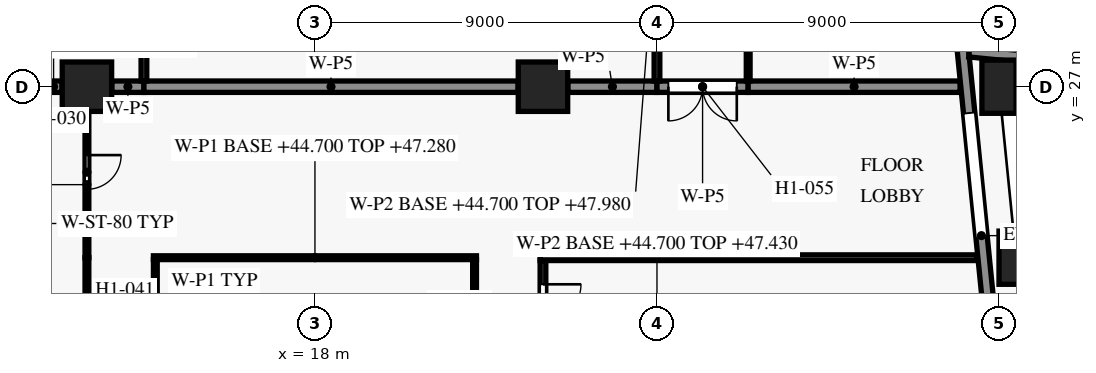
"""IFC4 building model, lengths in metres.
Left out: names, types, materials, properties, quantities, classifications, styles, units other than length and angle.
Written with IfcOpenShell. Run it as: python <this file> out.ifc"""

import sys

from ifc_helpers import new_model, si_unit, direction, frame, frame_2d, origin, origin_2d, place, context, subcontext, project, spatial, rectangle, extrude, element, fill, save


model = new_model("IFC4")
c1 = context("Model", 3, precision=1e-05, world=origin(), true_north=direction((0.0, 1.0)))
c2 = subcontext(c1, "Body", "Model", "MODEL_VIEW")
j1 = project(units=[si_unit("LENGTHUNIT", "METRE"), si_unit("PLANEANGLEUNIT", "RADIAN")], contexts=[c1])
p1 = place(None, origin())
s1 = spatial("IfcSite", under=j1, at=p1, CompositionType="ELEMENT")
p2 = place(p1, origin())
s2 = spatial("IfcBuilding", under=s1, at=p2, CompositionType="ELEMENT")
p3 = place(p2, frame((0.0, 0.0, 44.7)))
s3 = spatial("IfcBuildingStorey", under=s2, at=p3, CompositionType="ELEMENT", Elevation=44.7)
for number, where, z_axis, x_axis in (
    (1, (36.45, 22.5, 0.0), (0.0, 0.0, 1.0), (-0.1, 0.995, 0.0)),
    (2, (36.0, 27.0, 0.0), (0.0, 0.0, 1.0), (-0.1, 0.995, 0.0)),
):
    element("IfcColumn", number, at=place(p3, frame(where, z_axis=z_axis, x_axis=x_axis)), inside=s3, PredefinedType="COLUMN", context=c2, shape_type="SweptSolid", body=[
        extrude(rectangle(XDim=0.9, YDim=1.4, at=origin_2d()), origin(), (0.0, 0.0, 1.0), 3.6),
    ])
for number, where, z_axis, x_axis in (
    (3, (12.0, 27.0, 0.0), (0.0, 0.0, 1.0), (1.0, 0.0, 0.0)),
    (4, (24.0, 27.0, 0.0), (0.0, 0.0, 1.0), (1.0, 0.0, 0.0)),
):
    element("IfcColumn", number, at=place(p3, frame(where, z_axis=z_axis, x_axis=x_axis)), inside=s3, PredefinedType="COLUMN", context=c2, shape_type="SweptSolid", body=[
        extrude(rectangle(XDim=1.3, YDim=1.3, at=origin_2d()), origin(), (0.0, 0.0, 1.0), 3.6),
    ])
p4 = place(p3, frame((35.033, 28.132, 0.0), z_axis=(0.0, 0.0, 1.0), x_axis=(0.099487051997, -0.995038856771, 0.0)))
e5 = element("IfcWall", 5, at=p4, inside=s3, PredefinedType="SOLIDWALL", context=c2, shape_type="SweptSolid", body=[
    extrude(rectangle(XDim=10.152, YDim=0.3, at=frame_2d((5.076, 0.0))), origin(), (0.0, 0.0, 1.0), 2.95),
])
p5 = place(p4, frame((1.833, 0.0, 0.15)))
e6 = element("IfcOpeningElement", 6, at=p5, cuts=e5, PredefinedType="OPENING", context=c2, shape_type="SweptSolid", body=[
    extrude(rectangle(XDim=3.3, YDim=2.4, at=frame_2d((1.65, 1.2))), frame((0.0, 0.16, 0.0), z_axis=(0.0, -1.0, 0.0), x_axis=(1.0, 0.0, 0.0)), (0.0, 0.0, 1.0), 0.32),
])
p6 = place(p4, frame((7.106, 0.0, 0.75)))
e7 = element("IfcOpeningElement", 7, at=p6, cuts=e5, PredefinedType="OPENING", context=c2, shape_type="SweptSolid", body=[
    extrude(rectangle(XDim=1.8, YDim=1.8, at=frame_2d((0.9, 0.9))), frame((0.0, 0.16, 0.0), z_axis=(0.0, -1.0, 0.0), x_axis=(1.0, 0.0, 0.0)), (0.0, 0.0, 1.0), 0.32),
])
p7 = place(p3, frame((45.015, 26.953, 0.0), z_axis=(0.0, 0.0, 1.0), x_axis=(-0.995036699177, 0.099508629231, 0.0)))
e8 = element("IfcWall", 8, at=p7, inside=s3, PredefinedType="SOLIDWALL", context=c2, shape_type="SweptSolid", body=[
    extrude(rectangle(XDim=9.846, YDim=0.3, at=frame_2d((4.923, 0.0))), origin(), (0.0, 0.0, 1.0), 2.95),
])
p8 = place(p7, frame((1.291, 0.0, 0.75)))
e9 = element("IfcOpeningElement", 9, at=p8, cuts=e8, PredefinedType="OPENING", context=c2, shape_type="SweptSolid", body=[
    extrude(rectangle(XDim=1.8, YDim=1.8, at=frame_2d((0.9, 0.9))), frame((0.0, 0.16, 0.0), z_axis=(0.0, -1.0, 0.0), x_axis=(1.0, 0.0, 0.0)), (0.0, 0.0, 1.0), 0.32),
])
p9 = place(p7, frame((5.064, 0.0, 0.15)))
e10 = element("IfcOpeningElement", 10, at=p9, cuts=e8, PredefinedType="OPENING", context=c2, shape_type="SweptSolid", body=[
    extrude(rectangle(XDim=3.3, YDim=2.4, at=frame_2d((1.65, 1.2))), frame((0.0, 0.16, 0.0), z_axis=(0.0, -1.0, 0.0), x_axis=(1.0, 0.0, 0.0)), (0.0, 0.0, 1.0), 0.32),
])
p10 = place(p3, frame((22.2, 18.05, 0.0), z_axis=(0.0, 0.0, 1.0), x_axis=(0.0, 1.0, 0.0)))
e11 = element("IfcWall", 11, at=p10, inside=s3, PredefinedType="PARTITIONING", context=c2, shape_type="SweptSolid", body=[
    extrude(rectangle(XDim=4.4, YDim=0.1, at=frame_2d((2.2, 0.0))), origin(), (0.0, 0.0, 1.0), 2.73),
])
p11 = place(p3, frame((24.0, 22.425, 0.0), z_axis=(0.0, 0.0, 1.0), x_axis=(0.0, -1.0, 0.0)))
e12 = element("IfcWall", 12, at=p11, inside=s3, PredefinedType="PARTITIONING", context=c2, shape_type="SweptSolid", body=[
    extrude(rectangle(XDim=2.25, YDim=0.15, at=frame_2d((1.125, 0.0))), origin(), (0.0, 0.0, 1.0), 2.58),
])
p12 = place(p11, frame((0.625, 0.0, 0.0)))
e13 = element("IfcOpeningElement", 13, at=p12, cuts=e12, PredefinedType="OPENING", context=c2, shape_type="SweptSolid", body=[
    extrude(rectangle(XDim=1.0, YDim=2.1, at=frame_2d((0.5, 1.05))), frame((0.0, 0.085, 0.0), z_axis=(0.0, -1.0, 0.0), x_axis=(1.0, 0.0, 0.0)), (0.0, 0.0, 1.0), 0.17),
])
p13 = place(p3, frame((13.8, 22.45, 0.0), z_axis=(0.0, 0.0, 1.0), x_axis=(0.0, -1.0, 0.0)))
e14 = element("IfcWall", 14, at=p13, inside=s3, PredefinedType="PARTITIONING", context=c2, shape_type="SweptSolid", body=[
    extrude(rectangle(XDim=4.25, YDim=0.1, at=frame_2d((2.125, 0.0))), origin(), (0.0, 0.0, 1.0), 3.28),
])
p14 = place(p13, frame((1.75, 0.0, 0.0)))
e15 = element("IfcOpeningElement", 15, at=p14, cuts=e14, PredefinedType="OPENING", context=c2, shape_type="SweptSolid", body=[
    extrude(rectangle(XDim=0.9, YDim=2.1, at=frame_2d((0.45, 1.05))), frame((0.0, 0.06, 0.0), z_axis=(0.0, -1.0, 0.0), x_axis=(1.0, 0.0, 0.0)), (0.0, 0.0, 1.0), 0.12),
])
p15 = place(p3, frame((12.0, 22.5, 0.0), z_axis=(0.0, 0.0, 1.0), x_axis=(0.0, -1.0, 0.0)))
e16 = element("IfcWall", 16, at=p15, inside=s3, PredefinedType="PARTITIONING", context=c2, shape_type="SweptSolid", body=[
    extrude(rectangle(XDim=3.845, YDim=0.1, at=frame_2d((1.922, 0.0))), origin(), (0.0, 0.0, 1.0), 2.58),
])
p16 = place(p3, frame((12.0, 26.345, 0.0), z_axis=(0.0, 0.0, 1.0), x_axis=(0.0, -1.0, 0.0)))
e17 = element("IfcWall", 17, at=p16, inside=s3, PredefinedType="PARTITIONING", context=c2, shape_type="SweptSolid", body=[
    extrude(rectangle(XDim=3.845, YDim=0.1, at=frame_2d((1.922, 0.0))), origin(), (0.0, 0.0, 1.0), 2.58),
])
p17 = place(p16, frame((1.145, 0.0, 0.0)))
e18 = element("IfcOpeningElement", 18, at=p17, cuts=e17, PredefinedType="OPENING", context=c2, shape_type="SweptSolid", body=[
    extrude(rectangle(XDim=0.9, YDim=2.1, at=frame_2d((0.45, 1.05))), frame((0.0, 0.06, 0.0), z_axis=(0.0, -1.0, 0.0), x_axis=(1.0, 0.0, 0.0)), (0.0, 0.0, 1.0), 0.12),
])
p18 = place(p3, frame((22.25, 22.5, 0.0), z_axis=(0.0, 0.0, 1.0), x_axis=(-1.0, 0.0, 0.0)))
e19 = element("IfcWall", 19, at=p18, inside=s3, PredefinedType="PARTITIONING", context=c2, shape_type="SweptSolid", body=[
    extrude(rectangle(XDim=8.5, YDim=0.1, at=frame_2d((4.25, 0.0))), origin(), (0.0, 0.0, 1.0), 2.58),
])
p19 = place(p3, frame((35.425, 22.5, 0.0), z_axis=(0.0, 0.0, 1.0), x_axis=(-1.0, 0.0, 0.0)))
e20 = element("IfcWall", 20, at=p19, inside=s3, PredefinedType="PARTITIONING", context=c2, shape_type="SweptSolid", body=[
    extrude(rectangle(XDim=11.5, YDim=0.15, at=frame_2d((5.75, 0.0))), origin(), (0.0, 0.0, 1.0), 2.58),
])
p20 = place(p3, frame((11.345, 27.0, 0.0), z_axis=(0.0, 0.0, 1.0), x_axis=(-1.0, 0.0, 0.0)))
e21 = element("IfcWall", 21, at=p20, inside=s3, PredefinedType="PARTITIONING", context=c2, shape_type="SweptSolid", body=[
    extrude(rectangle(XDim=0.445, YDim=0.3, at=frame_2d((0.223, 0.0))), origin(), (0.0, 0.0, 1.0), 3.28),
])
p21 = place(p3, frame((13.5, 27.0, 0.0), z_axis=(0.0, 0.0, 1.0), x_axis=(-1.0, 0.0, 0.0)))
e22 = element("IfcWall", 22, at=p21, inside=s3, PredefinedType="PARTITIONING", context=c2, shape_type="SweptSolid", body=[
    extrude(rectangle(XDim=0.845, YDim=0.3, at=frame_2d((0.422, 0.0))), origin(), (0.0, 0.0, 1.0), 2.58),
])
p22 = place(p3, frame((23.345, 27.0, 0.0), z_axis=(0.0, 0.0, 1.0), x_axis=(-1.0, 0.0, 0.0)))
e23 = element("IfcWall", 23, at=p22, inside=s3, PredefinedType="PARTITIONING", context=c2, shape_type="SweptSolid", body=[
    extrude(rectangle(XDim=9.845, YDim=0.3, at=frame_2d((4.922, 0.0))), origin(), (0.0, 0.0, 1.0), 2.58),
])
p23 = place(p3, frame((27.0, 27.0, 0.0), z_axis=(0.0, 0.0, 1.0), x_axis=(-1.0, 0.0, 0.0)))
e24 = element("IfcWall", 24, at=p23, inside=s3, PredefinedType="PARTITIONING", context=c2, shape_type="SweptSolid", body=[
    extrude(rectangle(XDim=2.345, YDim=0.3, at=frame_2d((1.172, 0.0))), origin(), (0.0, 0.0, 1.0), 2.58),
])
p24 = place(p3, frame((29.4, 27.0, 0.0), z_axis=(0.0, 0.0, 1.0), x_axis=(-1.0, 0.0, 0.0)))
e25 = element("IfcWall", 25, at=p24, inside=s3, PredefinedType="PARTITIONING", context=c2, shape_type="SweptSolid", body=[
    extrude(rectangle(XDim=2.4, YDim=0.3, at=frame_2d((1.2, 0.0))), origin(), (0.0, 0.0, 1.0), 2.58),
])
p25 = place(p24, frame((0.3, 0.0, 0.0)))
e26 = element("IfcOpeningElement", 26, at=p25, cuts=e25, PredefinedType="OPENING", context=c2, shape_type="SweptSolid", body=[
    extrude(rectangle(XDim=1.8, YDim=2.1, at=frame_2d((0.9, 1.05))), frame((0.0, 0.16, 0.0), z_axis=(0.0, -1.0, 0.0), x_axis=(1.0, 0.0, 0.0)), (0.0, 0.0, 1.0), 0.32),
])
p26 = place(p3, frame((34.975, 27.0, 0.0), z_axis=(0.0, 0.0, 1.0), x_axis=(-1.0, 0.0, 0.0)))
e27 = element("IfcWall", 27, at=p26, inside=s3, PredefinedType="PARTITIONING", context=c2, shape_type="SweptSolid", body=[
    extrude(rectangle(XDim=5.575, YDim=0.3, at=frame_2d((2.788, 0.0))), origin(), (0.0, 0.0, 1.0), 2.58),
])
p27 = place(p3, frame((27.0, 27.15, 0.0), z_axis=(0.0, 0.0, 1.0), x_axis=(0.0, 1.0, 0.0)))
e28 = element("IfcWall", 28, at=p27, inside=s3, PredefinedType="PARTITIONING", context=c2, shape_type="SweptSolid", body=[
    extrude(rectangle(XDim=8.7, YDim=0.15, at=frame_2d((4.35, 0.0))), origin(), (0.0, 0.0, 1.0), 3.28),
])
p28 = place(p27, frame((3.45, 0.0, 0.0)))
e29 = element("IfcOpeningElement", 29, at=p28, cuts=e28, PredefinedType="OPENING", context=c2, shape_type="SweptSolid", body=[
    extrude(rectangle(XDim=1.8, YDim=2.1, at=frame_2d((0.9, 1.05))), frame((0.0, 0.085, 0.0), z_axis=(0.0, -1.0, 0.0), x_axis=(1.0, 0.0, 0.0)), (0.0, 0.0, 1.0), 0.17),
])
p29 = place(p3, frame((13.5, 27.15, 0.0), z_axis=(0.0, 0.0, 1.0), x_axis=(0.0, 1.0, 0.0)))
e30 = element("IfcWall", 30, at=p29, inside=s3, PredefinedType="PARTITIONING", context=c2, shape_type="SweptSolid", body=[
    extrude(rectangle(XDim=8.7, YDim=0.15, at=frame_2d((4.35, 0.0))), origin(), (0.0, 0.0, 1.0), 3.28),
])
p30 = place(p29, frame((3.45, 0.0, 0.0)))
e31 = element("IfcOpeningElement", 31, at=p30, cuts=e30, PredefinedType="OPENING", context=c2, shape_type="SweptSolid", body=[
    extrude(rectangle(XDim=1.8, YDim=2.1, at=frame_2d((0.9, 1.05))), frame((0.0, 0.085, 0.0), z_axis=(0.0, -1.0, 0.0), x_axis=(1.0, 0.0, 0.0)), (0.0, 0.0, 1.0), 0.17),
])
p31 = place(p3, frame((29.4, 35.95, 0.0), z_axis=(0.0, 0.0, 1.0), x_axis=(0.0, -1.0, 0.0)))
e32 = element("IfcWall", 32, at=p31, inside=s3, PredefinedType="PARTITIONING", context=c2, shape_type="SweptSolid", body=[
    extrude(rectangle(XDim=8.8, YDim=0.1, at=frame_2d((4.4, 0.0))), origin(), (0.0, 0.0, 1.0), 3.28),
])
p32 = place(p31, frame((4.5, 0.0, 0.0)))
e33 = element("IfcOpeningElement", 33, at=p32, cuts=e32, PredefinedType="OPENING", context=c2, shape_type="SweptSolid", body=[
    extrude(rectangle(XDim=0.9, YDim=2.1, at=frame_2d((0.45, 1.05))), frame((0.0, 0.06, 0.0), z_axis=(0.0, -1.0, 0.0), x_axis=(1.0, 0.0, 0.0)), (0.0, 0.0, 1.0), 0.12),
])
p33 = place(p5, origin())
e34 = element("IfcWindow", 34, at=p33, inside=s3, PartitioningType="SINGLE_PANEL", PredefinedType="WINDOW", context=c2, shape_type="SweptSolid", body=[
    extrude(rectangle(XDim=3.3, YDim=2.4, at=frame_2d((1.65, 1.2))), frame((0.0, 0.03, 0.0), z_axis=(0.0, -1.0, 0.0), x_axis=(1.0, 0.0, 0.0)), (0.0, 0.0, 1.0), 0.06),
])
fill(e6, e34)
p34 = place(p17, origin())
e35 = element("IfcDoor", 35, at=p34, inside=s3, OperationType="SINGLE_SWING_LEFT", PredefinedType="DOOR", context=c2, shape_type="SweptSolid", body=[
    extrude(rectangle(XDim=0.9, YDim=2.1, at=frame_2d((0.45, 1.05))), frame((0.0, 0.025, 0.0), z_axis=(0.0, -1.0, 0.0), x_axis=(1.0, 0.0, 0.0)), (0.0, 0.0, 1.0), 0.05),
])
fill(e18, e35)
p35 = place(p12, origin())
e36 = element("IfcDoor", 36, at=p35, inside=s3, OperationType="SINGLE_SWING_LEFT", PredefinedType="DOOR", context=c2, shape_type="SweptSolid", body=[
    extrude(rectangle(XDim=1.0, YDim=2.1, at=frame_2d((0.5, 1.05))), frame((0.0, 0.025, 0.0), z_axis=(0.0, -1.0, 0.0), x_axis=(1.0, 0.0, 0.0)), (0.0, 0.0, 1.0), 0.05),
])
fill(e13, e36)
p36 = place(p25, origin())
e37 = element("IfcDoor", 37, at=p36, inside=s3, OperationType="DOUBLE_DOOR_SINGLE_SWING", PredefinedType="DOOR", context=c2, shape_type="SweptSolid", body=[
    extrude(rectangle(XDim=1.8, YDim=2.1, at=frame_2d((0.9, 1.05))), frame((0.0, 0.025, 0.0), z_axis=(0.0, -1.0, 0.0), x_axis=(1.0, 0.0, 0.0)), (0.0, 0.0, 1.0), 0.05),
])
fill(e26, e37)
save(model, sys.argv[1])
